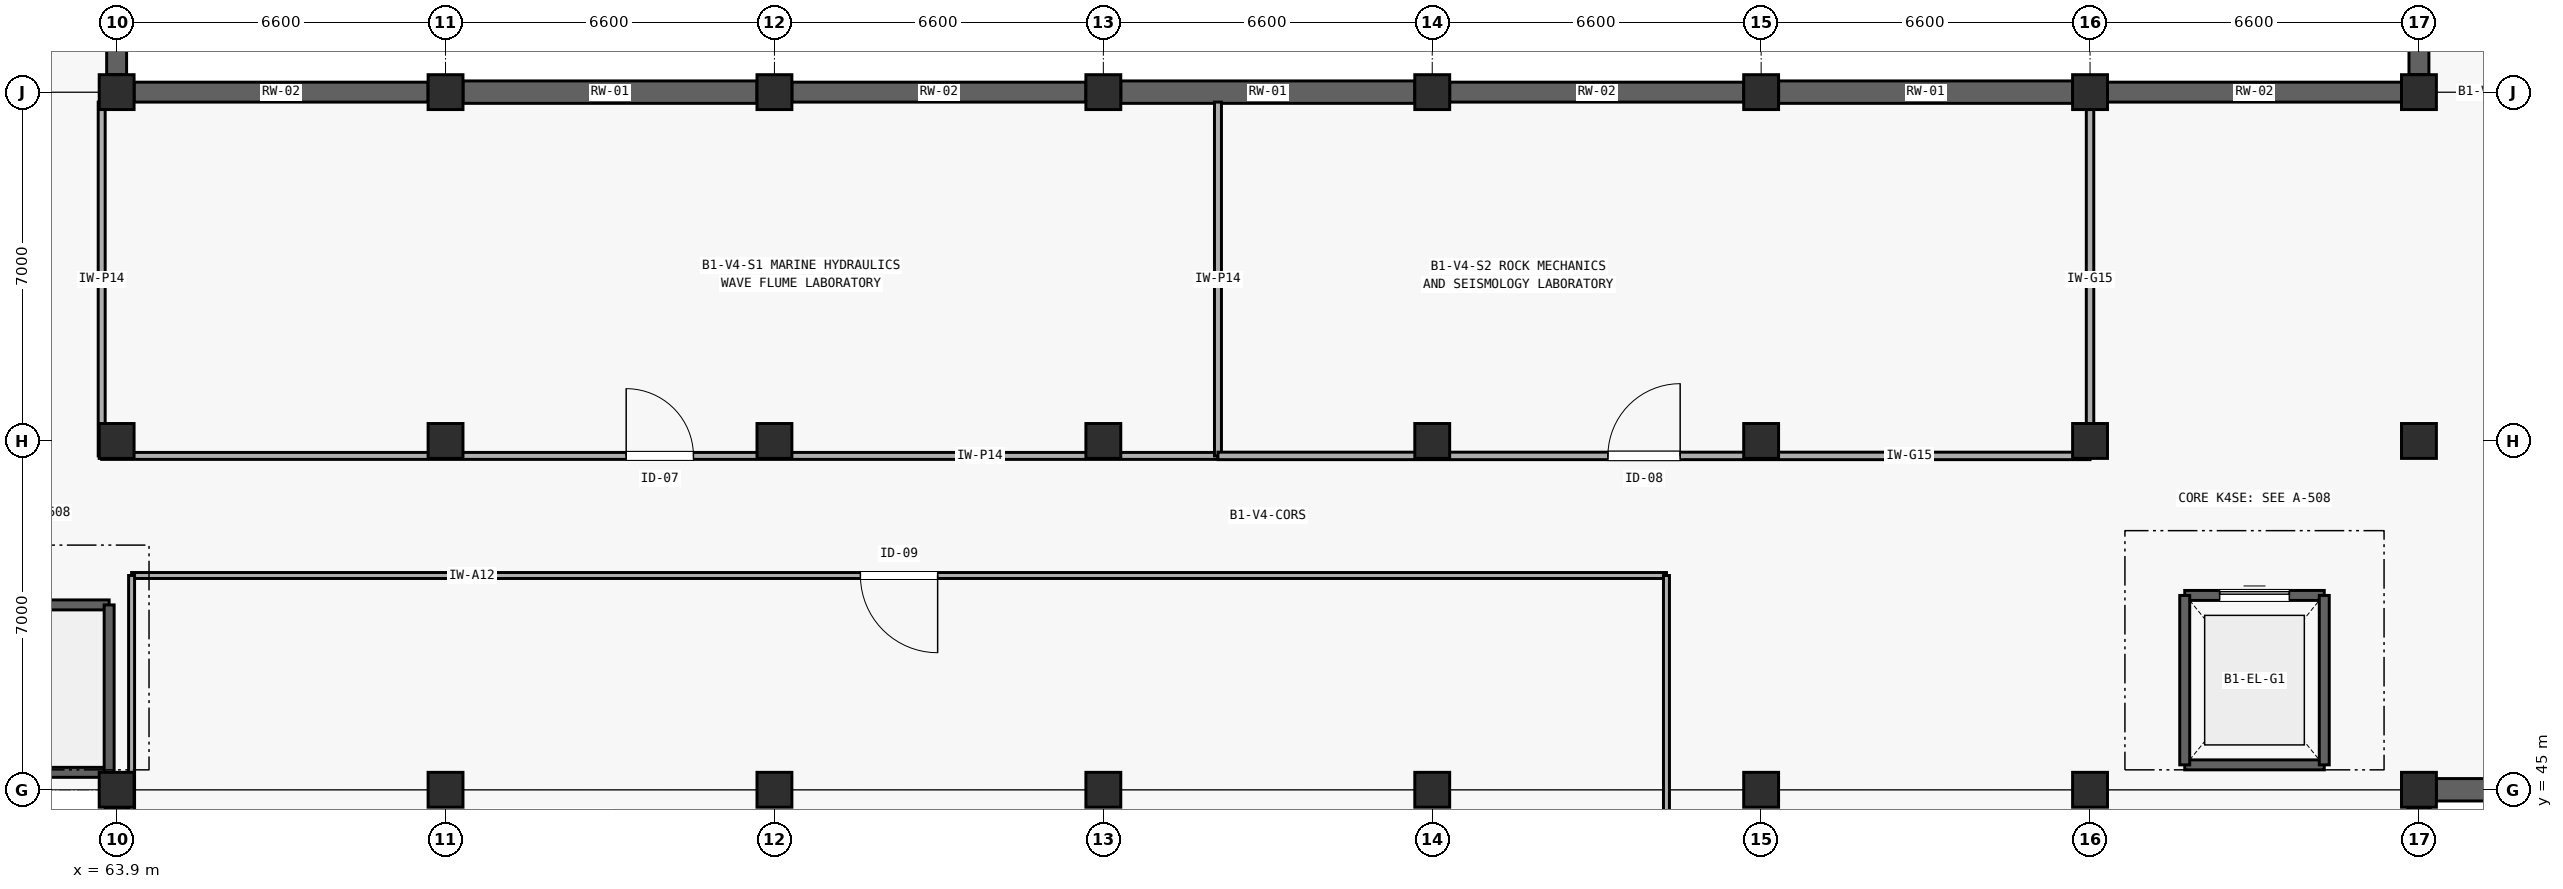
"""IFC4 building model, lengths in metres.
Left out: names, types, materials, properties, quantities, classifications, styles, units other than length and angle.
Written with IfcOpenShell. Run it as: python <this file> out.ifc"""

import sys

from ifc_helpers import new_model, si_unit, direction, frame, frame_2d, origin, origin_2d, place, context, subcontext, project, spatial, rectangle, extrude, element, fill, save


model = new_model("IFC4")
c1 = context("Model", 3, precision=1e-05, world=origin(), true_north=direction((0.0, 1.0)))
c2 = subcontext(c1, "Body", "Model", "MODEL_VIEW")
j1 = project(units=[si_unit("LENGTHUNIT", "METRE"), si_unit("PLANEANGLEUNIT", "RADIAN")], contexts=[c1])
p1 = place(None, origin())
s1 = spatial("IfcSite", under=j1, at=p1, CompositionType="ELEMENT")
p2 = place(p1, origin())
s2 = spatial("IfcBuilding", under=s1, at=p2, CompositionType="ELEMENT")
p3 = place(p2, frame((0.0, 0.0, -4.2)))
s3 = spatial("IfcBuildingStorey", under=s2, at=p3, CompositionType="ELEMENT", Elevation=-4.2)
for number, where, z_axis, x_axis in (
    (1, (63.9, 45.0, -0.4), (0.0, 0.0, 1.0), (1.0, 0.0, 0.0)),
    (2, (63.9, 52.0, -0.4), (0.0, 0.0, 1.0), (1.0, 0.0, 0.0)),
    (3, (63.9, 59.0, -0.4), (0.0, 0.0, 1.0), (1.0, 0.0, 0.0)),
    (4, (70.5, 45.0, -0.4), (0.0, 0.0, 1.0), (1.0, 0.0, 0.0)),
    (5, (70.5, 52.0, -0.4), (0.0, 0.0, 1.0), (1.0, 0.0, 0.0)),
    (6, (70.5, 59.0, -0.4), (0.0, 0.0, 1.0), (1.0, 0.0, 0.0)),
    (7, (77.1, 45.0, -0.4), (0.0, 0.0, 1.0), (1.0, 0.0, 0.0)),
    (8, (77.1, 52.0, -0.4), (0.0, 0.0, 1.0), (1.0, 0.0, 0.0)),
    (9, (77.1, 59.0, -0.4), (0.0, 0.0, 1.0), (1.0, 0.0, 0.0)),
    (10, (83.7, 45.0, -0.4), (0.0, 0.0, 1.0), (1.0, 0.0, 0.0)),
    (11, (83.7, 52.0, -0.4), (0.0, 0.0, 1.0), (1.0, 0.0, 0.0)),
    (12, (83.7, 59.0, -0.4), (0.0, 0.0, 1.0), (1.0, 0.0, 0.0)),
    (13, (90.3, 45.0, -0.4), (0.0, 0.0, 1.0), (1.0, 0.0, 0.0)),
    (14, (90.3, 52.0, -0.4), (0.0, 0.0, 1.0), (1.0, 0.0, 0.0)),
    (15, (90.3, 59.0, -0.4), (0.0, 0.0, 1.0), (1.0, 0.0, 0.0)),
    (16, (96.9, 45.0, -0.4), (0.0, 0.0, 1.0), (1.0, 0.0, 0.0)),
    (17, (96.9, 52.0, -0.4), (0.0, 0.0, 1.0), (1.0, 0.0, 0.0)),
    (18, (96.9, 59.0, -0.4), (0.0, 0.0, 1.0), (1.0, 0.0, 0.0)),
    (19, (103.5, 45.0, -0.4), (0.0, 0.0, 1.0), (1.0, 0.0, 0.0)),
    (20, (103.5, 52.0, -0.4), (0.0, 0.0, 1.0), (1.0, 0.0, 0.0)),
    (21, (103.5, 59.0, -0.4), (0.0, 0.0, 1.0), (1.0, 0.0, 0.0)),
    (22, (110.1, 45.0, -0.4), (0.0, 0.0, 1.0), (1.0, 0.0, 0.0)),
    (23, (110.1, 52.0, -0.4), (0.0, 0.0, 1.0), (1.0, 0.0, 0.0)),
    (24, (110.1, 59.0, -0.4), (0.0, 0.0, 1.0), (1.0, 0.0, 0.0)),
):
    element("IfcColumn", number, at=place(p3, frame(where, z_axis=z_axis, x_axis=x_axis)), inside=s3, PredefinedType="COLUMN", context=c2, shape_type="SweptSolid", body=[
        extrude(rectangle(XDim=0.7, YDim=0.7, at=origin_2d()), origin(), (0.0, 0.0, 1.0), 4.6),
    ])
p4 = place(p3, frame((110.45, 45.0, 0.0), z_axis=(0.0, 0.0, 1.0), x_axis=(1.0, 0.0, 0.0)))
e25 = element("IfcWall", 25, at=p4, inside=s3, PredefinedType="SHEAR", context=c2, shape_type="SweptSolid", body=[
    extrude(rectangle(XDim=5.9, YDim=0.45, at=frame_2d((2.95, 0.0))), origin(), (0.0, 0.0, 1.0), 3.85),
])
p5 = place(p3, frame((64.25, 59.0, 0.0), z_axis=(0.0, 0.0, 1.0), x_axis=(1.0, 0.0, 0.0)))
e26 = element("IfcWall", 26, at=p5, inside=s3, PredefinedType="SHEAR", context=c2, shape_type="SweptSolid", body=[
    extrude(rectangle(XDim=5.9, YDim=0.4, at=frame_2d((2.95, 0.0))), origin(), (0.0, 0.0, 1.0), 3.85),
])
p6 = place(p3, frame((70.85, 59.0, 0.0), z_axis=(0.0, 0.0, 1.0), x_axis=(1.0, 0.0, 0.0)))
e27 = element("IfcWall", 27, at=p6, inside=s3, PredefinedType="SHEAR", context=c2, shape_type="SweptSolid", body=[
    extrude(rectangle(XDim=5.9, YDim=0.45, at=frame_2d((2.95, 0.0))), origin(), (0.0, 0.0, 1.0), 3.85),
])
p7 = place(p3, frame((77.45, 59.0, 0.0), z_axis=(0.0, 0.0, 1.0), x_axis=(1.0, 0.0, 0.0)))
e28 = element("IfcWall", 28, at=p7, inside=s3, PredefinedType="SHEAR", context=c2, shape_type="SweptSolid", body=[
    extrude(rectangle(XDim=5.9, YDim=0.4, at=frame_2d((2.95, 0.0))), origin(), (0.0, 0.0, 1.0), 3.85),
])
p8 = place(p3, frame((84.05, 59.0, 0.0), z_axis=(0.0, 0.0, 1.0), x_axis=(1.0, 0.0, 0.0)))
e29 = element("IfcWall", 29, at=p8, inside=s3, PredefinedType="SHEAR", context=c2, shape_type="SweptSolid", body=[
    extrude(rectangle(XDim=5.9, YDim=0.45, at=frame_2d((2.95, 0.0))), origin(), (0.0, 0.0, 1.0), 3.85),
])
p9 = place(p3, frame((90.65, 59.0, 0.0), z_axis=(0.0, 0.0, 1.0), x_axis=(1.0, 0.0, 0.0)))
e30 = element("IfcWall", 30, at=p9, inside=s3, PredefinedType="SHEAR", context=c2, shape_type="SweptSolid", body=[
    extrude(rectangle(XDim=5.9, YDim=0.4, at=frame_2d((2.95, 0.0))), origin(), (0.0, 0.0, 1.0), 3.85),
])
p10 = place(p3, frame((97.25, 59.0, 0.0), z_axis=(0.0, 0.0, 1.0), x_axis=(1.0, 0.0, 0.0)))
e31 = element("IfcWall", 31, at=p10, inside=s3, PredefinedType="SHEAR", context=c2, shape_type="SweptSolid", body=[
    extrude(rectangle(XDim=5.9, YDim=0.45, at=frame_2d((2.95, 0.0))), origin(), (0.0, 0.0, 1.0), 3.85),
])
p11 = place(p3, frame((103.85, 59.0, 0.0), z_axis=(0.0, 0.0, 1.0), x_axis=(1.0, 0.0, 0.0)))
e32 = element("IfcWall", 32, at=p11, inside=s3, PredefinedType="SHEAR", context=c2, shape_type="SweptSolid", body=[
    extrude(rectangle(XDim=5.9, YDim=0.4, at=frame_2d((2.95, 0.0))), origin(), (0.0, 0.0, 1.0), 3.85),
])
p12 = place(p3, frame((63.9, 38.375, 0.0), z_axis=(0.0, 0.0, 1.0), x_axis=(0.0, 1.0, 0.0)))
e33 = element("IfcWall", 33, at=p12, inside=s3, PredefinedType="SHEAR", context=c2, shape_type="SweptSolid", body=[
    extrude(rectangle(XDim=6.275, YDim=0.45, at=frame_2d((3.137, 0.0))), origin(), (0.0, 0.0, 1.0), 3.85),
])
p13 = place(p3, frame((63.9, 59.35, 0.0), z_axis=(0.0, 0.0, 1.0), x_axis=(0.0, 1.0, 0.0)))
e34 = element("IfcWall", 34, at=p13, inside=s3, PredefinedType="SHEAR", context=c2, shape_type="SweptSolid", body=[
    extrude(rectangle(XDim=6.3, YDim=0.4, at=frame_2d((3.15, 0.0))), origin(), (0.0, 0.0, 1.0), 3.85),
])
p14 = place(p3, frame((110.1, 38.375, 0.0), z_axis=(0.0, 0.0, 1.0), x_axis=(0.0, 1.0, 0.0)))
e35 = element("IfcWall", 35, at=p14, inside=s3, PredefinedType="SHEAR", context=c2, shape_type="SweptSolid", body=[
    extrude(rectangle(XDim=6.275, YDim=0.45, at=frame_2d((3.137, 0.0))), origin(), (0.0, 0.0, 1.0), 3.85),
])
p15 = place(p3, frame((110.1, 59.35, 0.0), z_axis=(0.0, 0.0, 1.0), x_axis=(0.0, 1.0, 0.0)))
e36 = element("IfcWall", 36, at=p15, inside=s3, PredefinedType="SHEAR", context=c2, shape_type="SweptSolid", body=[
    extrude(rectangle(XDim=6.3, YDim=0.4, at=frame_2d((3.15, 0.0))), origin(), (0.0, 0.0, 1.0), 3.85),
])
p16 = place(p3, frame((57.45, 45.35, -0.4), z_axis=(0.0, 0.0, 1.0), x_axis=(1.0, 0.0, 0.0)))
e37 = element("IfcWall", 37, at=p16, inside=s3, PredefinedType="SHEAR", context=c2, shape_type="SweptSolid", body=[
    extrude(rectangle(XDim=6.3, YDim=0.2, at=frame_2d((3.15, 0.0))), origin(), (0.0, 0.0, 1.0), 4.6),
])
p17 = place(p3, frame((57.45, 48.71, -0.4), z_axis=(0.0, 0.0, 1.0), x_axis=(1.0, 0.0, 0.0)))
e38 = element("IfcWall", 38, at=p17, inside=s3, PredefinedType="SHEAR", context=c2, shape_type="SweptSolid", body=[
    extrude(rectangle(XDim=6.3, YDim=0.2, at=frame_2d((3.15, 0.0))), origin(), (0.0, 0.0, 1.0), 4.6),
])
p18 = place(p17, frame((0.32, 0.0, 0.4)))
e39 = element("IfcOpeningElement", 39, at=p18, cuts=e38, PredefinedType="OPENING", context=c2, shape_type="SweptSolid", body=[
    extrude(rectangle(XDim=1.2, YDim=2.15, at=frame_2d((0.6, 1.075))), frame((0.0, 0.11, 0.0), z_axis=(0.0, -1.0, 0.0), x_axis=(1.0, 0.0, 0.0)), (0.0, 0.0, 1.0), 0.22),
])
p19 = place(p3, frame((63.75, 45.35, -0.4), z_axis=(0.0, 0.0, 1.0), x_axis=(0.0, 1.0, 0.0)))
e40 = element("IfcWall", 40, at=p19, inside=s3, PredefinedType="SHEAR", context=c2, shape_type="SweptSolid", body=[
    extrude(rectangle(XDim=3.36, YDim=0.2, at=frame_2d((1.68, 0.0))), origin(), (0.0, 0.0, 1.0), 4.6),
])
p20 = place(p3, frame((105.4, 45.5, -0.4), z_axis=(0.0, 0.0, 1.0), x_axis=(1.0, 0.0, 0.0)))
e41 = element("IfcWall", 41, at=p20, inside=s3, PredefinedType="SHEAR", context=c2, shape_type="SweptSolid", body=[
    extrude(rectangle(XDim=2.8, YDim=0.2, at=frame_2d((1.4, 0.0))), origin(), (0.0, 0.0, 1.0), 4.6),
])
p21 = place(p3, frame((105.4, 48.9, -0.4), z_axis=(0.0, 0.0, 1.0), x_axis=(1.0, 0.0, 0.0)))
e42 = element("IfcWall", 42, at=p21, inside=s3, PredefinedType="SHEAR", context=c2, shape_type="SweptSolid", body=[
    extrude(rectangle(XDim=2.8, YDim=0.2, at=frame_2d((1.4, 0.0))), origin(), (0.0, 0.0, 1.0), 4.6),
])
p22 = place(p21, frame((0.7, 0.0, 0.4)))
e43 = element("IfcOpeningElement", 43, at=p22, cuts=e42, PredefinedType="OPENING", context=c2, shape_type="SweptSolid", body=[
    extrude(rectangle(XDim=1.4, YDim=2.3, at=frame_2d((0.7, 1.15))), frame((0.0, 0.11, 0.0), z_axis=(0.0, -1.0, 0.0), x_axis=(1.0, 0.0, 0.0)), (0.0, 0.0, 1.0), 0.22),
])
for number, where, z_axis, x_axis in (
    (44, (105.4, 45.5, -0.4), (0.0, 0.0, 1.0), (0.0, 1.0, 0.0)),
    (45, (108.2, 45.5, -0.4), (0.0, 0.0, 1.0), (0.0, 1.0, 0.0)),
):
    element("IfcWall", number, at=place(p3, frame(where, z_axis=z_axis, x_axis=x_axis)), inside=s3, PredefinedType="SHEAR", context=c2, shape_type="SweptSolid", body=[
        extrude(rectangle(XDim=3.4, YDim=0.2, at=frame_2d((1.7, 0.0))), origin(), (0.0, 0.0, 1.0), 4.6),
    ])
p23 = place(p3, frame((63.6, 51.7, 0.0), z_axis=(0.0, 0.0, 1.0), x_axis=(1.0, 0.0, 0.0)))
e46 = element("IfcWall", 46, at=p23, inside=s3, PredefinedType="PLUMBINGWALL", context=c2, shape_type="SweptSolid", body=[
    extrude(rectangle(XDim=22.4, YDim=0.14, at=frame_2d((11.2, 0.0))), origin(), (0.0, 0.0, 1.0), 3.135),
])
p24 = place(p23, frame((10.525, 0.0, 0.0)))
e47 = element("IfcOpeningElement", 47, at=p24, cuts=e46, PredefinedType="OPENING", context=c2, shape_type="SweptSolid", body=[
    extrude(rectangle(XDim=1.35, YDim=2.2, at=frame_2d((0.675, 1.1))), frame((0.0, 0.08, 0.0), z_axis=(0.0, -1.0, 0.0), x_axis=(1.0, 0.0, 0.0)), (0.0, 0.0, 1.0), 0.16),
])
p25 = place(p3, frame((63.6, 51.7, 0.0), z_axis=(0.0, 0.0, 1.0), x_axis=(0.0, 1.0, 0.0)))
e48 = element("IfcWall", 48, at=p25, inside=s3, PredefinedType="PLUMBINGWALL", context=c2, shape_type="SweptSolid", body=[
    extrude(rectangle(XDim=7.1, YDim=0.14, at=frame_2d((3.55, 0.0))), origin(), (0.0, 0.0, 1.0), 3.665),
])
p26 = place(p3, frame((86.0, 51.7, 0.0), z_axis=(0.0, 0.0, 1.0), x_axis=(0.0, 1.0, 0.0)))
e49 = element("IfcWall", 49, at=p26, inside=s3, PredefinedType="PLUMBINGWALL", context=c2, shape_type="SweptSolid", body=[
    extrude(rectangle(XDim=7.1, YDim=0.14, at=frame_2d((3.55, 0.0))), origin(), (0.0, 0.0, 1.0), 3.9),
])
p27 = place(p3, frame((86.0, 51.7, 0.0), z_axis=(0.0, 0.0, 1.0), x_axis=(1.0, 0.0, 0.0)))
e50 = element("IfcWall", 50, at=p27, inside=s3, PredefinedType="PARTITIONING", context=c2, shape_type="SweptSolid", body=[
    extrude(rectangle(XDim=17.5, YDim=0.15, at=frame_2d((8.75, 0.0))), origin(), (0.0, 0.0, 1.0), 3.135),
])
p28 = place(p27, frame((7.825, 0.0, 0.0)))
e51 = element("IfcOpeningElement", 51, at=p28, cuts=e50, PredefinedType="OPENING", context=c2, shape_type="SweptSolid", body=[
    extrude(rectangle(XDim=1.45, YDim=2.2, at=frame_2d((0.725, 1.1))), frame((0.0, 0.085, 0.0), z_axis=(0.0, -1.0, 0.0), x_axis=(1.0, 0.0, 0.0)), (0.0, 0.0, 1.0), 0.17),
])
p29 = place(p3, frame((103.5, 51.7, 0.0), z_axis=(0.0, 0.0, 1.0), x_axis=(0.0, 1.0, 0.0)))
e52 = element("IfcWall", 52, at=p29, inside=s3, PredefinedType="PARTITIONING", context=c2, shape_type="SweptSolid", body=[
    extrude(rectangle(XDim=7.1, YDim=0.15, at=frame_2d((3.55, 0.0))), origin(), (0.0, 0.0, 1.0), 3.665),
])
p30 = place(p3, frame((64.2, 49.3, 0.0), z_axis=(0.0, 0.0, 1.0), x_axis=(1.0, 0.0, 0.0)))
e53 = element("IfcWall", 53, at=p30, inside=s3, PredefinedType="PARTITIONING", context=c2, shape_type="SweptSolid", body=[
    extrude(rectangle(XDim=30.8, YDim=0.12, at=frame_2d((15.4, 0.0))), origin(), (0.0, 0.0, 1.0), 3.9),
])
p31 = place(p30, frame((14.625, 0.0, 0.0)))
e54 = element("IfcOpeningElement", 54, at=p31, cuts=e53, PredefinedType="OPENING", context=c2, shape_type="SweptSolid", body=[
    extrude(rectangle(XDim=1.55, YDim=2.2, at=frame_2d((0.775, 1.1))), frame((0.0, 0.07, 0.0), z_axis=(0.0, -1.0, 0.0), x_axis=(1.0, 0.0, 0.0)), (0.0, 0.0, 1.0), 0.14),
])
for number, where, z_axis, x_axis in (
    (55, (64.2, 38.2, 0.0), (0.0, 0.0, 1.0), (0.0, 1.0, 0.0)),
    (56, (95.0, 38.2, 0.0), (0.0, 0.0, 1.0), (0.0, 1.0, 0.0)),
):
    element("IfcWall", number, at=place(p3, frame(where, z_axis=z_axis, x_axis=x_axis)), inside=s3, PredefinedType="PARTITIONING", context=c2, shape_type="SweptSolid", body=[
        extrude(rectangle(XDim=11.1, YDim=0.12, at=frame_2d((5.55, 0.0))), origin(), (0.0, 0.0, 1.0), 3.9),
    ])
p32 = place(p22, origin())
e57 = element("IfcDoor", 57, at=p32, inside=s3, OperationType="SLIDING_TO_LEFT", PredefinedType="DOOR", context=c2, shape_type="SweptSolid", body=[
    extrude(rectangle(XDim=1.4, YDim=2.3, at=frame_2d((0.7, 1.15))), frame((0.0, 0.025, 0.0), z_axis=(0.0, -1.0, 0.0), x_axis=(1.0, 0.0, 0.0)), (0.0, 0.0, 1.0), 0.05),
])
fill(e43, e57)
p33 = place(p24, origin())
e58 = element("IfcDoor", 58, at=p33, inside=s3, OperationType="SINGLE_SWING_LEFT", PredefinedType="DOOR", context=c2, shape_type="SweptSolid", body=[
    extrude(rectangle(XDim=1.35, YDim=2.2, at=frame_2d((0.675, 1.1))), frame((0.0, 0.025, 0.0), z_axis=(0.0, -1.0, 0.0), x_axis=(1.0, 0.0, 0.0)), (0.0, 0.0, 1.0), 0.05),
])
fill(e47, e58)
p34 = place(p28, origin())
e59 = element("IfcDoor", 59, at=p34, inside=s3, OperationType="SINGLE_SWING_RIGHT", PredefinedType="DOOR", context=c2, shape_type="SweptSolid", body=[
    extrude(rectangle(XDim=1.45, YDim=2.2, at=frame_2d((0.725, 1.1))), frame((0.0, 0.025, 0.0), z_axis=(0.0, -1.0, 0.0), x_axis=(1.0, 0.0, 0.0)), (0.0, 0.0, 1.0), 0.05),
])
fill(e51, e59)
p35 = place(p31, frame((1.55, 0.0, 0.0), z_axis=(0.0, 0.0, 1.0), x_axis=(-1.0, 0.0, 0.0)))
e60 = element("IfcDoor", 60, at=p35, inside=s3, OperationType="SINGLE_SWING_LEFT", PredefinedType="DOOR", context=c2, shape_type="SweptSolid", body=[
    extrude(rectangle(XDim=1.55, YDim=2.2, at=frame_2d((0.775, 1.1))), frame((0.0, 0.025, 0.0), z_axis=(0.0, -1.0, 0.0), x_axis=(1.0, 0.0, 0.0)), (0.0, 0.0, 1.0), 0.05),
])
fill(e54, e60)
save(model, sys.argv[1])
